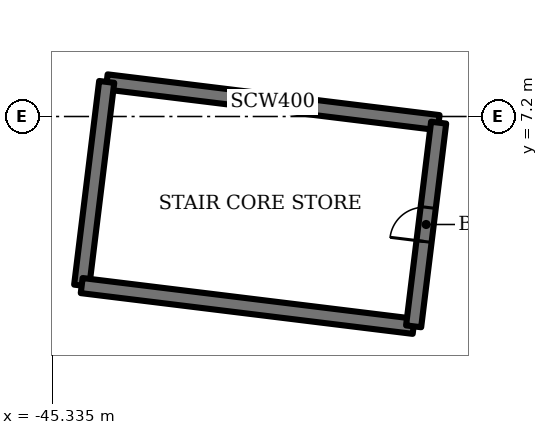
"""IFC4 building model, lengths in metres.
Left out: names, types, materials, properties, quantities, classifications, styles, units other than length and angle.
Written with IfcOpenShell. Run it as: python <this file> out.ifc"""

import sys

from ifc_helpers import new_model, si_unit, direction, frame, frame_2d, origin, place, context, subcontext, project, spatial, rectangle, extrude, element, fill, save


model = new_model("IFC4")
c1 = context("Model", 3, precision=1e-05, world=origin(), true_north=direction((0.0, 1.0)))
c2 = subcontext(c1, "Body", "Model", "MODEL_VIEW")
j1 = project(units=[si_unit("LENGTHUNIT", "METRE"), si_unit("PLANEANGLEUNIT", "RADIAN")], contexts=[c1])
p1 = place(None, origin())
s1 = spatial("IfcSite", under=j1, at=p1, CompositionType="ELEMENT")
p2 = place(p1, origin())
s2 = spatial("IfcBuilding", under=s1, at=p2, CompositionType="ELEMENT")
p3 = place(p2, frame((0.0, 0.0, -5.5)))
s3 = spatial("IfcBuildingStorey", under=s2, at=p3, CompositionType="ELEMENT", Elevation=-5.5)
p4 = place(p3, frame((-35.165, 7.038, 0.0), z_axis=(0.0, 0.0, 1.0), x_axis=(-0.992545280606, 0.121876437212, 0.0)))
e1 = element("IfcWall", 1, at=p4, inside=s3, PredefinedType="SHEAR", context=c2, shape_type="SweptSolid", body=[
    extrude(rectangle(XDim=8.8, YDim=0.4, at=frame_2d((4.4, 0.0))), origin(), (0.0, 0.0, 1.0), 5.5),
])
p5 = place(p3, frame((-43.899, 8.11, 0.0), z_axis=(0.0, 0.0, 1.0), x_axis=(-0.12184754212, -0.99254882826, 0.0)))
e2 = element("IfcWall", 2, at=p5, inside=s3, PredefinedType="SHEAR", context=c2, shape_type="SweptSolid", body=[
    extrude(rectangle(XDim=5.4, YDim=0.4, at=frame_2d((2.7, 0.0))), origin(), (0.0, 0.0, 1.0), 5.5),
])
p6 = place(p3, frame((-44.557, 2.751, 0.0), z_axis=(0.0, 0.0, 1.0), x_axis=(0.992545280606, -0.121876437212, 0.0)))
e3 = element("IfcWall", 3, at=p6, inside=s3, PredefinedType="SHEAR", context=c2, shape_type="SweptSolid", body=[
    extrude(rectangle(XDim=8.8, YDim=0.4, at=frame_2d((4.4, 0.0))), origin(), (0.0, 0.0, 1.0), 5.5),
])
p7 = place(p3, frame((-35.823, 1.678, 0.0), z_axis=(0.0, 0.0, 1.0), x_axis=(0.12184754212, 0.99254882826, 0.0)))
e4 = element("IfcWall", 4, at=p7, inside=s3, PredefinedType="SHEAR", context=c2, shape_type="SweptSolid", body=[
    extrude(rectangle(XDim=5.4, YDim=0.4, at=frame_2d((2.7, 0.0))), origin(), (0.0, 0.0, 1.0), 5.5),
])
p8 = place(p7, frame((2.25, 0.0, 0.0)))
e5 = element("IfcOpeningElement", 5, at=p8, cuts=e4, PredefinedType="OPENING", context=c2, shape_type="SweptSolid", body=[
    extrude(rectangle(XDim=0.9, YDim=2.1, at=frame_2d((0.45, 1.05))), frame((0.0, 0.21, 0.0), z_axis=(0.0, -1.0, 0.0), x_axis=(1.0, 0.0, 0.0)), (0.0, 0.0, 1.0), 0.42),
])
p9 = place(p8, origin())
e6 = element("IfcDoor", 6, at=p9, inside=s3, OperationType="SINGLE_SWING_LEFT", PredefinedType="DOOR", context=c2, shape_type="SweptSolid", body=[
    extrude(rectangle(XDim=0.9, YDim=2.1, at=frame_2d((0.45, 1.05))), frame((0.0, 0.025, 0.0), z_axis=(0.0, -1.0, 0.0), x_axis=(1.0, 0.0, 0.0)), (0.0, 0.0, 1.0), 0.05),
])
fill(e5, e6)
save(model, sys.argv[1])
